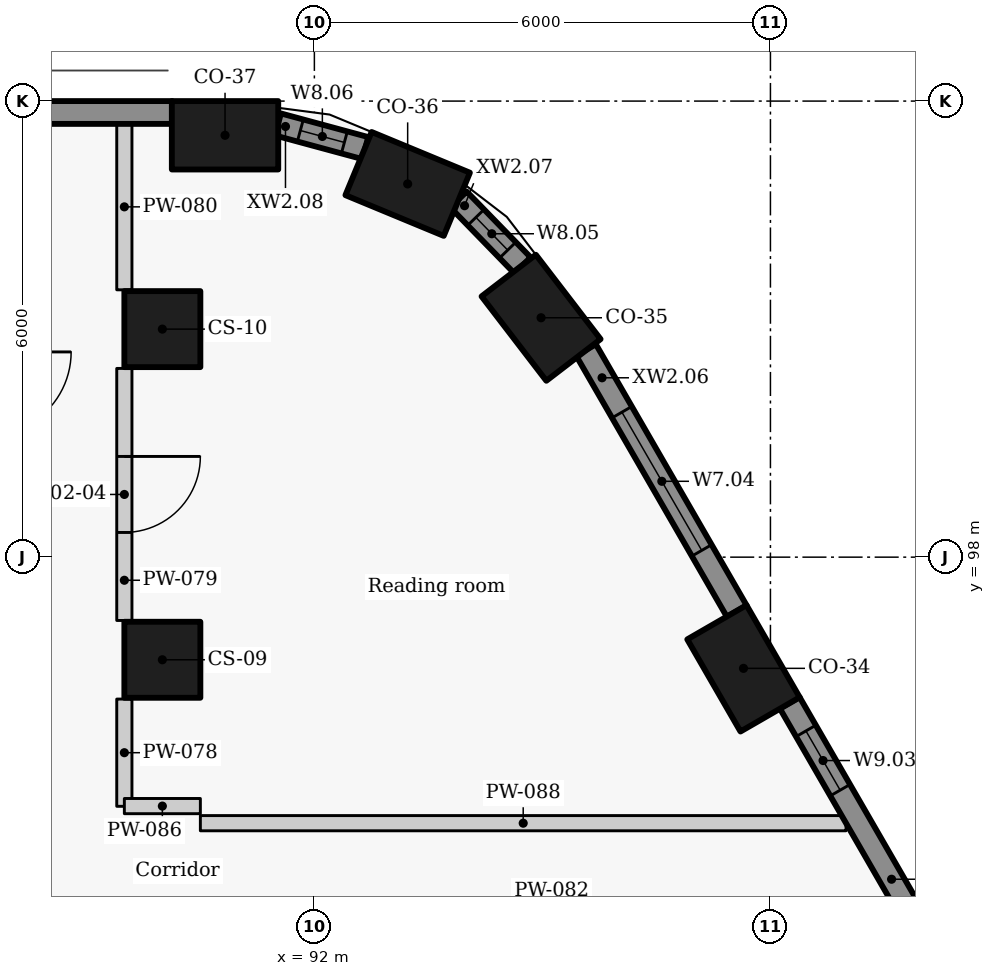
"""IFC4 building model, lengths in metres.
Left out: names, types, materials, properties, quantities, classifications, styles, units other than length and angle.
Written with IfcOpenShell. Run it as: python <this file> out.ifc"""

import sys

from ifc_helpers import new_model, si_unit, direction, frame, frame_2d, origin, origin_2d, place, context, subcontext, project, spatial, rectangle, extrude, element, fill, save


model = new_model("IFC4")
c1 = context("Model", 3, precision=1e-05, world=origin(), true_north=direction((0.0, 1.0)))
c2 = subcontext(c1, "Body", "Model", "MODEL_VIEW")
j1 = project(units=[si_unit("LENGTHUNIT", "METRE"), si_unit("PLANEANGLEUNIT", "RADIAN")], contexts=[c1])
p1 = place(None, origin())
s1 = spatial("IfcSite", under=j1, at=p1, CompositionType="ELEMENT")
p2 = place(p1, origin())
s2 = spatial("IfcBuilding", under=s1, at=p2, CompositionType="ELEMENT")
p3 = place(p2, frame((0.0, 0.0, 107.4)))
s3 = spatial("IfcBuildingStorey", under=s2, at=p3, CompositionType="ELEMENT", Elevation=107.4)
for number, where, z_axis, x_axis in (
    (1, (97.646, 96.537, 0.0), (0.0, 0.0, 1.0), (-0.5, 0.866, 0.0)),
    (2, (94.982, 101.149, 0.0), (0.0, 0.0, 1.0), (-0.609, 0.793, 0.0)),
    (3, (93.227, 102.91, 0.0), (0.0, 0.0, 1.0), (-0.924, 0.383, 0.0)),
    (4, (90.825, 103.55, 0.0), (0.0, 0.0, 1.0), (-1.0, 0.0, 0.0)),
):
    element("IfcColumn", number, at=place(p3, frame(where, z_axis=z_axis, x_axis=x_axis)), inside=s3, PredefinedType="COLUMN", context=c2, shape_type="SweptSolid", body=[
        extrude(rectangle(XDim=1.4, YDim=0.9, at=origin_2d()), origin(), (0.0, 0.0, 1.0), 3.3),
    ])
for number, where, z_axis, x_axis in (
    (5, (90.0, 96.65, 0.0), (0.0, 0.0, 1.0), (0.0, 1.0, 0.0)),
    (6, (90.0, 101.0, 0.0), (0.0, 0.0, 1.0), (0.0, 1.0, 0.0)),
):
    element("IfcColumn", number, at=place(p3, frame(where, z_axis=z_axis, x_axis=x_axis)), inside=s3, PredefinedType="COLUMN", context=c2, shape_type="SweptSolid", body=[
        extrude(rectangle(XDim=1.0, YDim=1.0, at=origin_2d()), origin(), (0.0, 0.0, 1.0), 3.3),
    ])
p4 = place(p3, frame((100.22, 92.677, 0.0), z_axis=(0.0, 0.0, 1.0), x_axis=(-0.499957037901, 0.866050206543, 0.0)))
e7 = element("IfcWall", 7, at=p4, inside=s3, PredefinedType="SOLIDWALL", context=c2, shape_type="SweptSolid", body=[
    extrude(rectangle(XDim=3.934, YDim=0.3, at=frame_2d((1.967, 0.0))), origin(), (0.0, 0.0, 1.0), 2.425),
])
p5 = place(p4, frame((2.606, 0.0, 0.9)))
e8 = element("IfcOpeningElement", 8, at=p5, cuts=e7, PredefinedType="OPENING", context=c2, shape_type="SweptSolid", body=[
    extrude(rectangle(XDim=0.9, YDim=1.1, at=frame_2d((0.45, 0.55))), frame((0.0, 0.16, 0.0), z_axis=(0.0, -1.0, 0.0), x_axis=(1.0, 0.0, 0.0)), (0.0, 0.0, 1.0), 0.32),
])
p6 = place(p3, frame((97.557, 97.29, 0.0), z_axis=(0.0, 0.0, 1.0), x_axis=(-0.500043828347, 0.866000097998, 0.0)))
e9 = element("IfcWall", 9, at=p6, inside=s3, PredefinedType="SOLIDWALL", context=c2, shape_type="SweptSolid", body=[
    extrude(rectangle(XDim=3.968, YDim=0.3, at=frame_2d((1.984, 0.0))), origin(), (0.0, 0.0, 1.0), 2.425),
])
p7 = place(p6, frame((0.922, 0.0, 0.9)))
e10 = element("IfcOpeningElement", 10, at=p7, cuts=e9, PredefinedType="OPENING", context=c2, shape_type="SweptSolid", body=[
    extrude(rectangle(XDim=2.1, YDim=1.1, at=frame_2d((1.05, 0.55))), frame((0.0, 0.16, 0.0), z_axis=(0.0, -1.0, 0.0), x_axis=(1.0, 0.0, 0.0)), (0.0, 0.0, 1.0), 0.32),
])
p8 = place(p3, frame((94.738, 101.839, 0.0), z_axis=(0.0, 0.0, 1.0), x_axis=(-0.697032216592, 0.717039809936, 0.0)))
e11 = element("IfcWall", 11, at=p8, inside=s3, PredefinedType="SOLIDWALL", context=c2, shape_type="SweptSolid", body=[
    extrude(rectangle(XDim=1.208, YDim=0.3, at=frame_2d((0.604, 0.0))), origin(), (0.0, 0.0, 1.0), 2.425),
])
p9 = place(p8, frame((0.279, 0.0, 0.9)))
e12 = element("IfcOpeningElement", 12, at=p9, cuts=e11, PredefinedType="OPENING", context=c2, shape_type="SweptSolid", body=[
    extrude(rectangle(XDim=0.6, YDim=1.1, at=frame_2d((0.3, 0.55))), frame((0.0, 0.16, 0.0), z_axis=(0.0, -1.0, 0.0), x_axis=(1.0, 0.0, 0.0)), (0.0, 0.0, 1.0), 0.32),
])
p10 = place(p3, frame((92.669, 103.382, 0.0), z_axis=(0.0, 0.0, 1.0), x_axis=(-0.965278131029, 0.261224290136, 0.0)))
e13 = element("IfcWall", 13, at=p10, inside=s3, PredefinedType="SOLIDWALL", context=c2, shape_type="SweptSolid", body=[
    extrude(rectangle(XDim=1.19, YDim=0.3, at=frame_2d((0.595, 0.0))), origin(), (0.0, 0.0, 1.0), 2.425),
])
p11 = place(p10, frame((0.285, 0.0, 0.9)))
e14 = element("IfcOpeningElement", 14, at=p11, cuts=e13, PredefinedType="OPENING", context=c2, shape_type="SweptSolid", body=[
    extrude(rectangle(XDim=0.6, YDim=1.1, at=frame_2d((0.3, 0.55))), frame((0.0, 0.16, 0.0), z_axis=(0.0, -1.0, 0.0), x_axis=(1.0, 0.0, 0.0)), (0.0, 0.0, 1.0), 0.32),
])
p12 = place(p3, frame((90.129, 103.85, 0.0), z_axis=(0.0, 0.0, 1.0), x_axis=(-1.0, 0.0, 0.0)))
e15 = element("IfcWall", 15, at=p12, inside=s3, PredefinedType="SOLIDWALL", context=c2, shape_type="SweptSolid", body=[
    extrude(rectangle(XDim=20.291, YDim=0.3, at=frame_2d((10.146, 0.0))), origin(), (0.0, 0.0, 1.0), 2.425),
])
p13 = place(p3, frame((89.5, 94.722, 0.0), z_axis=(0.0, 0.0, 1.0), x_axis=(0.0, 1.0, 0.0)))
e16 = element("IfcWall", 16, at=p13, inside=s3, PredefinedType="PARTITIONING", context=c2, shape_type="SweptSolid", body=[
    extrude(rectangle(XDim=1.411, YDim=0.2, at=frame_2d((0.706, 0.0))), origin(), (0.0, 0.0, 1.0), 3.025),
])
p14 = place(p3, frame((89.5, 100.483, 0.0), z_axis=(0.0, 0.0, 1.0), x_axis=(0.0, -1.0, 0.0)))
e17 = element("IfcWall", 17, at=p14, inside=s3, PredefinedType="PARTITIONING", context=c2, shape_type="SweptSolid", body=[
    extrude(rectangle(XDim=3.316, YDim=0.2, at=frame_2d((1.658, 0.0))), origin(), (0.0, 0.0, 1.0), 3.025),
])
p15 = place(p14, frame((1.158, 0.0, 0.0)))
e18 = element("IfcOpeningElement", 18, at=p15, cuts=e17, PredefinedType="OPENING", context=c2, shape_type="SweptSolid", body=[
    extrude(rectangle(XDim=1.0, YDim=2.1, at=frame_2d((0.5, 1.05))), frame((0.0, 0.11, 0.0), z_axis=(0.0, -1.0, 0.0), x_axis=(1.0, 0.0, 0.0)), (0.0, 0.0, 1.0), 0.22),
])
p16 = place(p3, frame((89.5, 101.517, 0.0), z_axis=(0.0, 0.0, 1.0), x_axis=(0.0, 1.0, 0.0)))
e19 = element("IfcWall", 19, at=p16, inside=s3, PredefinedType="PARTITIONING", context=c2, shape_type="SweptSolid", body=[
    extrude(rectangle(XDim=2.183, YDim=0.2, at=frame_2d((1.091, 0.0))), origin(), (0.0, 0.0, 1.0), 3.025),
])
p17 = place(p3, frame((89.5, 94.725, 0.0), z_axis=(0.0, 0.0, 1.0), x_axis=(1.0, 0.0, 0.0)))
e20 = element("IfcWall", 20, at=p17, inside=s3, PredefinedType="PARTITIONING", context=c2, shape_type="SweptSolid", body=[
    extrude(rectangle(XDim=1.0, YDim=0.2, at=frame_2d((0.5, 0.0))), origin(), (0.0, 0.0, 1.0), 2.505),
])
p18 = place(p3, frame((90.5, 94.5, 0.0), z_axis=(0.0, 0.0, 1.0), x_axis=(1.0, 0.0, 0.0)))
e21 = element("IfcWall", 21, at=p18, inside=s3, PredefinedType="PARTITIONING", context=c2, shape_type="SweptSolid", body=[
    extrude(rectangle(XDim=8.495, YDim=0.2, at=frame_2d((4.248, 0.0))), origin(), (0.0, 0.0, 1.0), 2.405),
])
p19 = place(p5, origin())
e22 = element("IfcWindow", 22, at=p19, inside=s3, PartitioningType="SINGLE_PANEL", PredefinedType="WINDOW", context=c2, shape_type="SweptSolid", body=[
    extrude(rectangle(XDim=0.9, YDim=1.1, at=frame_2d((0.45, 0.55))), frame((0.0, 0.03, 0.0), z_axis=(0.0, -1.0, 0.0), x_axis=(1.0, 0.0, 0.0)), (0.0, 0.0, 1.0), 0.06),
])
fill(e8, e22)
p20 = place(p7, origin())
e23 = element("IfcWindow", 23, at=p20, inside=s3, PartitioningType="SINGLE_PANEL", PredefinedType="WINDOW", context=c2, shape_type="SweptSolid", body=[
    extrude(rectangle(XDim=2.1, YDim=1.1, at=frame_2d((1.05, 0.55))), frame((0.0, 0.03, 0.0), z_axis=(0.0, -1.0, 0.0), x_axis=(1.0, 0.0, 0.0)), (0.0, 0.0, 1.0), 0.06),
])
fill(e10, e23)
p21 = place(p9, origin())
e24 = element("IfcWindow", 24, at=p21, inside=s3, PartitioningType="SINGLE_PANEL", PredefinedType="WINDOW", context=c2, shape_type="SweptSolid", body=[
    extrude(rectangle(XDim=0.6, YDim=1.1, at=frame_2d((0.3, 0.55))), frame((0.0, 0.03, 0.0), z_axis=(0.0, -1.0, 0.0), x_axis=(1.0, 0.0, 0.0)), (0.0, 0.0, 1.0), 0.06),
])
fill(e12, e24)
p22 = place(p11, origin())
e25 = element("IfcWindow", 25, at=p22, inside=s3, PartitioningType="SINGLE_PANEL", PredefinedType="WINDOW", context=c2, shape_type="SweptSolid", body=[
    extrude(rectangle(XDim=0.6, YDim=1.1, at=frame_2d((0.3, 0.55))), frame((0.0, 0.03, 0.0), z_axis=(0.0, -1.0, 0.0), x_axis=(1.0, 0.0, 0.0)), (0.0, 0.0, 1.0), 0.06),
])
fill(e14, e25)
p23 = place(p15, origin())
e26 = element("IfcDoor", 26, at=p23, inside=s3, OperationType="SINGLE_SWING_LEFT", PredefinedType="DOOR", context=c2, shape_type="SweptSolid", body=[
    extrude(rectangle(XDim=1.0, YDim=2.1, at=frame_2d((0.5, 1.05))), frame((0.0, 0.025, 0.0), z_axis=(0.0, -1.0, 0.0), x_axis=(1.0, 0.0, 0.0)), (0.0, 0.0, 1.0), 0.05),
])
fill(e18, e26)
save(model, sys.argv[1])
